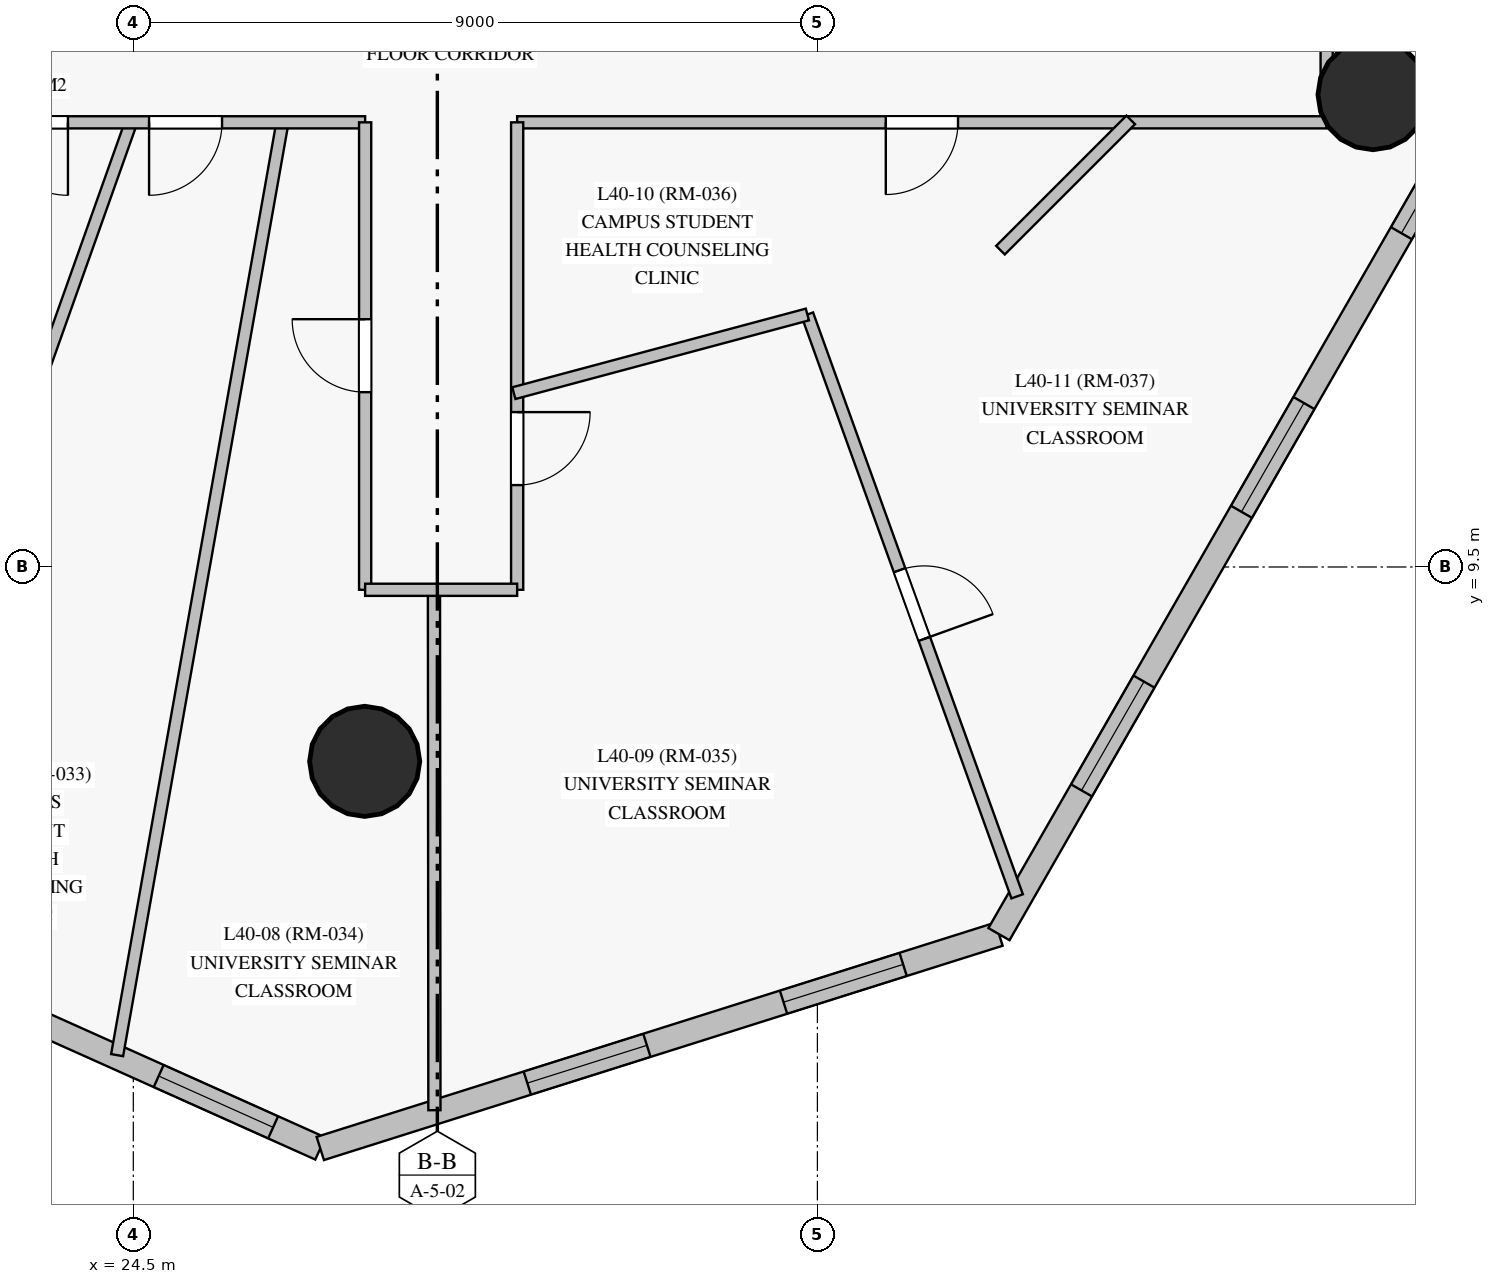
"""IFC4 building model, lengths in metres.
Left out: names, types, materials, properties, quantities, classifications, styles, units other than length and angle.
Written with IfcOpenShell. Run it as: python <this file> out.ifc"""

import sys

from ifc_helpers import new_model, si_unit, direction, frame, frame_2d, origin, origin_with_axes, origin_2d, place, context, subcontext, project, spatial, rectangle, circle, extrude, source, transform, mapped, element, fill, save


model = new_model("IFC4")
c1 = context("Model", 3, precision=1e-05, world=origin(), true_north=direction((0.0, 1.0)))
c2 = subcontext(c1, "Body", "Model", "MODEL_VIEW")
j1 = project(units=[si_unit("LENGTHUNIT", "METRE"), si_unit("PLANEANGLEUNIT", "RADIAN")], contexts=[c1])
p1 = place(None, origin())
s1 = spatial("IfcSite", under=j1, at=p1, CompositionType="ELEMENT")
p2 = place(p1, origin())
s2 = spatial("IfcBuilding", under=s1, at=p2, CompositionType="ELEMENT")
p3 = place(p2, frame((0.0, 0.0, 141.95)))
s3 = spatial("IfcBuildingStorey", under=s2, at=p3, CompositionType="ELEMENT", Elevation=141.95)
m1 = source(origin_with_axes(), c2, "Body", "SweptSolid", [
    extrude(circle(Radius=0.725, at=origin_2d()), origin(), (0.0, 0.0, 1.0), 3.05),
])
for number, where, z_axis, x_axis in (
    (1, (27.544, 6.943, 0.0), (0.0, 0.0, 1.0), (1.0, 0.0, 0.0)),
    (2, (40.81, 15.714, 0.0), (0.0, 0.0, 1.0), (1.0, 0.0, 0.0)),
):
    element("IfcColumn", number, at=place(p3, frame(where, z_axis=z_axis, x_axis=x_axis)), inside=s3, PredefinedType="COLUMN", context=c2, shape_type="MappedRepresentation", body=[
        mapped(m1, transform((0.0, 0.0, 0.0), scale=1.0)),
    ])
p4 = place(p3, frame((16.283, 6.638, 0.0), z_axis=(0.0, 0.0, 1.0), x_axis=(0.912466082441, -0.409152353524, 0.0)))
e3 = element("IfcWall", 3, at=p4, inside=s3, PredefinedType="SOLIDWALL", context=c2, shape_type="SweptSolid", body=[
    extrude(rectangle(XDim=11.701, YDim=0.32, at=frame_2d((5.851, 0.0))), origin(), (0.0, 0.0, 1.0), 2.825),
])
p5 = place(p4, frame((2.215, 0.0, 0.85)))
e4 = element("IfcOpeningElement", 4, at=p5, cuts=e3, PredefinedType="OPENING", context=c2, shape_type="SweptSolid", body=[
    extrude(rectangle(XDim=1.65, YDim=1.65, at=frame_2d((0.825, 0.825))), frame((0.0, 0.17, 0.0), z_axis=(0.0, -1.0, 0.0), x_axis=(1.0, 0.0, 0.0)), (0.0, 0.0, 1.0), 0.34),
])
p6 = place(p4, frame((5.954, 0.0, 0.85)))
e5 = element("IfcOpeningElement", 5, at=p6, cuts=e3, PredefinedType="OPENING", context=c2, shape_type="SweptSolid", body=[
    extrude(rectangle(XDim=1.65, YDim=1.65, at=frame_2d((0.825, 0.825))), frame((0.0, 0.17, 0.0), z_axis=(0.0, -1.0, 0.0), x_axis=(1.0, 0.0, 0.0)), (0.0, 0.0, 1.0), 0.34),
])
p7 = place(p4, frame((9.372, 0.0, 0.85)))
e6 = element("IfcOpeningElement", 6, at=p7, cuts=e3, PredefinedType="OPENING", context=c2, shape_type="SweptSolid", body=[
    extrude(rectangle(XDim=1.65, YDim=1.65, at=frame_2d((0.825, 0.825))), frame((0.0, 0.17, 0.0), z_axis=(0.0, -1.0, 0.0), x_axis=(1.0, 0.0, 0.0)), (0.0, 0.0, 1.0), 0.34),
])
p8 = place(p3, frame((26.96, 1.85, 0.0), z_axis=(0.0, 0.0, 1.0), x_axis=(0.953587787618, 0.301115146257, 0.0)))
e7 = element("IfcWall", 7, at=p8, inside=s3, PredefinedType="SOLIDWALL", context=c2, shape_type="SweptSolid", body=[
    extrude(rectangle(XDim=9.364, YDim=0.32, at=frame_2d((4.682, 0.0))), origin(), (0.0, 0.0, 1.0), 2.825),
])
p9 = place(p8, frame((2.856, 0.0, 0.85)))
e8 = element("IfcOpeningElement", 8, at=p9, cuts=e7, PredefinedType="OPENING", context=c2, shape_type="SweptSolid", body=[
    extrude(rectangle(XDim=1.65, YDim=1.65, at=frame_2d((0.825, 0.825))), frame((0.0, 0.17, 0.0), z_axis=(0.0, -1.0, 0.0), x_axis=(1.0, 0.0, 0.0)), (0.0, 0.0, 1.0), 0.34),
])
p10 = place(p8, frame((6.391, 0.0, 0.85)))
e9 = element("IfcOpeningElement", 9, at=p10, cuts=e7, PredefinedType="OPENING", context=c2, shape_type="SweptSolid", body=[
    extrude(rectangle(XDim=1.65, YDim=1.65, at=frame_2d((0.825, 0.825))), frame((0.0, 0.17, 0.0), z_axis=(0.0, -1.0, 0.0), x_axis=(1.0, 0.0, 0.0)), (0.0, 0.0, 1.0), 0.34),
])
p11 = place(p3, frame((35.889, 4.67, 0.0), z_axis=(0.0, 0.0, 1.0), x_axis=(0.497941368399, 0.867210697372, 0.0)))
e10 = element("IfcWall", 10, at=p11, inside=s3, PredefinedType="SOLIDWALL", context=c2, shape_type="SweptSolid", body=[
    extrude(rectangle(XDim=13.951, YDim=0.32, at=frame_2d((6.976, 0.0))), origin(), (0.0, 0.0, 1.0), 2.825),
])
p12 = place(p11, frame((2.181, 0.0, 0.85)))
e11 = element("IfcOpeningElement", 11, at=p12, cuts=e10, PredefinedType="OPENING", context=c2, shape_type="SweptSolid", body=[
    extrude(rectangle(XDim=1.65, YDim=1.65, at=frame_2d((0.825, 0.825))), frame((0.0, 0.17, 0.0), z_axis=(0.0, -1.0, 0.0), x_axis=(1.0, 0.0, 0.0)), (0.0, 0.0, 1.0), 0.34),
])
p13 = place(p11, frame((6.407, 0.0, 0.85)))
e12 = element("IfcOpeningElement", 12, at=p13, cuts=e10, PredefinedType="OPENING", context=c2, shape_type="SweptSolid", body=[
    extrude(rectangle(XDim=1.65, YDim=1.65, at=frame_2d((0.825, 0.825))), frame((0.0, 0.17, 0.0), z_axis=(0.0, -1.0, 0.0), x_axis=(1.0, 0.0, 0.0)), (0.0, 0.0, 1.0), 0.34),
])
p14 = place(p11, frame((10.633, 0.0, 0.85)))
e13 = element("IfcOpeningElement", 13, at=p14, cuts=e10, PredefinedType="OPENING", context=c2, shape_type="SweptSolid", body=[
    extrude(rectangle(XDim=1.65, YDim=1.65, at=frame_2d((0.825, 0.825))), frame((0.0, 0.17, 0.0), z_axis=(0.0, -1.0, 0.0), x_axis=(1.0, 0.0, 0.0)), (0.0, 0.0, 1.0), 0.34),
])
p15 = place(p3, frame((40.2, 37.65, 0.0), z_axis=(0.0, 0.0, 1.0), x_axis=(0.0, -1.0, 0.0)))
e14 = element("IfcWall", 14, at=p15, inside=s3, PredefinedType="PARTITIONING", context=c2, shape_type="SweptSolid", body=[
    extrude(rectangle(XDim=22.3, YDim=0.16, at=frame_2d((11.15, 0.0))), origin(), (0.0, 0.0, 1.0), 2.325),
])
p16 = place(p15, frame((14.02, 0.0, 0.0)))
e15 = element("IfcOpeningElement", 15, at=p16, cuts=e14, PredefinedType="OPENING", context=c2, shape_type="SweptSolid", body=[
    extrude(rectangle(XDim=0.96, YDim=2.15, at=frame_2d((0.48, 1.075))), frame((0.0, 0.09, 0.0), z_axis=(0.0, -1.0, 0.0), x_axis=(1.0, 0.0, 0.0)), (0.0, 0.0, 1.0), 0.18),
])
p17 = place(p15, frame((10.675, 0.0, 0.0)))
e16 = element("IfcOpeningElement", 16, at=p17, cuts=e14, PredefinedType="OPENING", context=c2, shape_type="SweptSolid", body=[
    extrude(rectangle(XDim=0.95, YDim=2.15, at=frame_2d((0.475, 1.075))), frame((0.0, 0.09, 0.0), z_axis=(0.0, -1.0, 0.0), x_axis=(1.0, 0.0, 0.0)), (0.0, 0.0, 1.0), 0.18),
])
p18 = place(p15, frame((5.1, 0.0, 0.0)))
e17 = element("IfcOpeningElement", 17, at=p18, cuts=e14, PredefinedType="OPENING", context=c2, shape_type="SweptSolid", body=[
    extrude(rectangle(XDim=0.96, YDim=2.15, at=frame_2d((0.48, 1.075))), frame((0.0, 0.09, 0.0), z_axis=(0.0, -1.0, 0.0), x_axis=(1.0, 0.0, 0.0)), (0.0, 0.0, 1.0), 0.18),
])
p19 = place(p3, frame((26.468, 15.379, 0.0), z_axis=(0.0, 0.0, 1.0), x_axis=(-0.174546687902, -0.984648898716, 0.0)))
e18 = element("IfcWall", 18, at=p19, inside=s3, PredefinedType="PARTITIONING", context=c2, shape_type="SweptSolid", body=[
    extrude(rectangle(XDim=12.493, YDim=0.16, at=frame_2d((6.247, 0.0))), origin(), (0.0, 0.0, 1.0), 2.225),
])
p20 = place(p3, frame((24.481, 15.378, 0.0), z_axis=(0.0, 0.0, 1.0), x_axis=(-0.335074645571, -0.942191584496, 0.0)))
e19 = element("IfcWall", 19, at=p20, inside=s3, PredefinedType="PARTITIONING", context=c2, shape_type="SweptSolid", body=[
    extrude(rectangle(XDim=11.341, YDim=0.16, at=frame_2d((5.67, 0.0))), origin(), (0.0, 0.0, 1.0), 2.825),
])
p21 = place(p3, frame((27.55, 15.35, 0.0), z_axis=(0.0, 0.0, 1.0), x_axis=(-1.0, 0.0, 0.0)))
e20 = element("IfcWall", 20, at=p21, inside=s3, PredefinedType="PARTITIONING", context=c2, shape_type="SweptSolid", body=[
    extrude(rectangle(XDim=10.85, YDim=0.16, at=frame_2d((5.425, 0.0))), origin(), (0.0, 0.0, 1.0), 2.325),
])
p22 = place(p21, frame((7.167, 0.0, 0.0)))
e21 = element("IfcOpeningElement", 21, at=p22, cuts=e20, PredefinedType="OPENING", context=c2, shape_type="SweptSolid", body=[
    extrude(rectangle(XDim=0.95, YDim=2.15, at=frame_2d((0.475, 1.075))), frame((0.0, 0.09, 0.0), z_axis=(0.0, -1.0, 0.0), x_axis=(1.0, 0.0, 0.0)), (0.0, 0.0, 1.0), 0.18),
])
p23 = place(p21, frame((3.91, 0.0, 0.0)))
e22 = element("IfcOpeningElement", 22, at=p23, cuts=e20, PredefinedType="OPENING", context=c2, shape_type="SweptSolid", body=[
    extrude(rectangle(XDim=0.96, YDim=2.15, at=frame_2d((0.48, 1.075))), frame((0.0, 0.09, 0.0), z_axis=(0.0, -1.0, 0.0), x_axis=(1.0, 0.0, 0.0)), (0.0, 0.0, 1.0), 0.18),
])
p24 = place(p21, frame((1.883, 0.0, 0.0)))
e23 = element("IfcOpeningElement", 23, at=p24, cuts=e20, PredefinedType="OPENING", context=c2, shape_type="SweptSolid", body=[
    extrude(rectangle(XDim=0.96, YDim=2.15, at=frame_2d((0.48, 1.075))), frame((0.0, 0.09, 0.0), z_axis=(0.0, -1.0, 0.0), x_axis=(1.0, 0.0, 0.0)), (0.0, 0.0, 1.0), 0.18),
])
p25 = place(p21, frame((8.278, 0.0, 0.0)))
e24 = element("IfcOpeningElement", 24, at=p25, cuts=e20, PredefinedType="OPENING", context=c2, shape_type="SweptSolid", body=[
    extrude(rectangle(XDim=0.95, YDim=2.15, at=frame_2d((0.475, 1.075))), frame((0.0, 0.09, 0.0), z_axis=(0.0, -1.0, 0.0), x_axis=(1.0, 0.0, 0.0)), (0.0, 0.0, 1.0), 0.18),
])
p26 = place(p3, frame((40.2, 15.35, 0.0), z_axis=(0.0, 0.0, 1.0), x_axis=(-1.0, 0.0, 0.0)))
e25 = element("IfcWall", 25, at=p26, inside=s3, PredefinedType="PARTITIONING", context=c2, shape_type="SweptSolid", body=[
    extrude(rectangle(XDim=10.65, YDim=0.16, at=frame_2d((5.325, 0.0))), origin(), (0.0, 0.0, 1.0), 2.225),
])
p27 = place(p26, frame((4.85, 0.0, 0.0)))
e26 = element("IfcOpeningElement", 26, at=p27, cuts=e25, PredefinedType="OPENING", context=c2, shape_type="SweptSolid", body=[
    extrude(rectangle(XDim=0.95, YDim=2.15, at=frame_2d((0.475, 1.075))), frame((0.0, 0.09, 0.0), z_axis=(0.0, -1.0, 0.0), x_axis=(1.0, 0.0, 0.0)), (0.0, 0.0, 1.0), 0.18),
])
p28 = place(p3, frame((33.368, 12.822, 0.0), z_axis=(0.0, 0.0, 1.0), x_axis=(0.339168856977, -0.940725510687, 0.0)))
e27 = element("IfcWall", 27, at=p28, inside=s3, PredefinedType="PARTITIONING", context=c2, shape_type="SweptSolid", body=[
    extrude(rectangle(XDim=8.137, YDim=0.16, at=frame_2d((4.068, 0.0))), origin(), (0.0, 0.0, 1.0), 2.825),
])
p29 = place(p28, frame((3.576, 0.0, 0.0)))
e28 = element("IfcOpeningElement", 28, at=p29, cuts=e27, PredefinedType="OPENING", context=c2, shape_type="SweptSolid", body=[
    extrude(rectangle(XDim=0.96, YDim=2.15, at=frame_2d((0.48, 1.075))), frame((0.0, 0.09, 0.0), z_axis=(0.0, -1.0, 0.0), x_axis=(1.0, 0.0, 0.0)), (0.0, 0.0, 1.0), 0.18),
])
p30 = place(p3, frame((28.455, 9.23, 0.0), z_axis=(0.0, 0.0, 1.0), x_axis=(0.000887594623, -0.999999606088, 0.0)))
e29 = element("IfcWall", 29, at=p30, inside=s3, PredefinedType="PARTITIONING", context=c2, shape_type="SweptSolid", body=[
    extrude(rectangle(XDim=6.876, YDim=0.16, at=frame_2d((3.438, 0.0))), origin(), (0.0, 0.0, 1.0), 2.825),
])
p31 = place(p3, frame((29.55, 15.35, 0.0), z_axis=(0.0, 0.0, 1.0), x_axis=(0.0, -1.0, 0.0)))
e30 = element("IfcWall", 30, at=p31, inside=s3, PredefinedType="PARTITIONING", context=c2, shape_type="SweptSolid", body=[
    extrude(rectangle(XDim=6.15, YDim=0.16, at=frame_2d((3.075, 0.0))), origin(), (0.0, 0.0, 1.0), 2.825),
])
p32 = place(p31, frame((3.812, 0.0, 0.0)))
e31 = element("IfcOpeningElement", 31, at=p32, cuts=e30, PredefinedType="OPENING", context=c2, shape_type="SweptSolid", body=[
    extrude(rectangle(XDim=0.96, YDim=2.15, at=frame_2d((0.48, 1.075))), frame((0.0, 0.09, 0.0), z_axis=(0.0, -1.0, 0.0), x_axis=(1.0, 0.0, 0.0)), (0.0, 0.0, 1.0), 0.18),
])
p33 = place(p3, frame((27.55, 9.2, 0.0), z_axis=(0.0, 0.0, 1.0), x_axis=(0.0, 1.0, 0.0)))
e32 = element("IfcWall", 32, at=p33, inside=s3, PredefinedType="PARTITIONING", context=c2, shape_type="SweptSolid", body=[
    extrude(rectangle(XDim=6.15, YDim=0.16, at=frame_2d((3.075, 0.0))), origin(), (0.0, 0.0, 1.0), 2.225),
])
p34 = place(p33, frame((2.6, 0.0, 0.0)))
e33 = element("IfcOpeningElement", 33, at=p34, cuts=e32, PredefinedType="OPENING", context=c2, shape_type="SweptSolid", body=[
    extrude(rectangle(XDim=0.96, YDim=2.15, at=frame_2d((0.48, 1.075))), frame((0.0, 0.09, 0.0), z_axis=(0.0, -1.0, 0.0), x_axis=(1.0, 0.0, 0.0)), (0.0, 0.0, 1.0), 0.18),
])
p35 = place(p3, frame((29.507, 11.787, 0.0), z_axis=(0.0, 0.0, 1.0), x_axis=(0.965928152622, 0.258810362952, 0.0)))
e34 = element("IfcWall", 34, at=p35, inside=s3, PredefinedType="PARTITIONING", context=c2, shape_type="SweptSolid", body=[
    extrude(rectangle(XDim=3.998, YDim=0.16, at=frame_2d((1.999, 0.0))), origin(), (0.0, 0.0, 1.0), 2.325),
])
p36 = place(p3, frame((37.623, 15.382, 0.0), z_axis=(0.0, 0.0, 1.0), x_axis=(-0.707106781187, -0.707106781187, 0.0)))
e35 = element("IfcWall", 35, at=p36, inside=s3, PredefinedType="PARTITIONING", context=c2, shape_type="SweptSolid", body=[
    extrude(rectangle(XDim=2.424, YDim=0.16, at=frame_2d((1.212, 0.0))), origin(), (0.0, 0.0, 1.0), 2.325),
])
p37 = place(p3, frame((29.55, 9.2, 0.0), z_axis=(0.0, 0.0, 1.0), x_axis=(-1.0, 0.0, 0.0)))
e36 = element("IfcWall", 36, at=p37, inside=s3, PredefinedType="PARTITIONING", context=c2, shape_type="SweptSolid", body=[
    extrude(rectangle(XDim=2.0, YDim=0.16, at=frame_2d((1.0, 0.0))), origin(), (0.0, 0.0, 1.0), 2.325),
])
m2 = source(origin_with_axes(), c2, "Body", "SweptSolid", [
    extrude(rectangle(XDim=1.65, YDim=1.65, at=frame_2d((0.825, 0.825))), frame((0.0, 0.03, 0.0), z_axis=(0.0, -1.0, 0.0), x_axis=(1.0, 0.0, 0.0)), (0.0, 0.0, 1.0), 0.06),
])
p38 = place(p7, origin())
e37 = element("IfcWindow", 37, at=p38, inside=s3, PartitioningType="SINGLE_PANEL", PredefinedType="WINDOW", context=c2, shape_type="MappedRepresentation", body=[
    mapped(m2, transform((0.0, 0.0, 0.0), scale=1.0)),
])
fill(e6, e37)
p39 = place(p9, origin())
e38 = element("IfcWindow", 38, at=p39, inside=s3, PartitioningType="SINGLE_PANEL", PredefinedType="WINDOW", context=c2, shape_type="MappedRepresentation", body=[
    mapped(m2, transform((0.0, 0.0, 0.0), scale=1.0)),
])
fill(e8, e38)
p40 = place(p10, origin())
e39 = element("IfcWindow", 39, at=p40, inside=s3, PartitioningType="SINGLE_PANEL", PredefinedType="WINDOW", context=c2, shape_type="MappedRepresentation", body=[
    mapped(m2, transform((0.0, 0.0, 0.0), scale=1.0)),
])
fill(e9, e39)
p41 = place(p12, origin())
e40 = element("IfcWindow", 40, at=p41, inside=s3, PartitioningType="SINGLE_PANEL", PredefinedType="WINDOW", context=c2, shape_type="MappedRepresentation", body=[
    mapped(m2, transform((0.0, 0.0, 0.0), scale=1.0)),
])
fill(e11, e40)
p42 = place(p13, origin())
e41 = element("IfcWindow", 41, at=p42, inside=s3, PartitioningType="SINGLE_PANEL", PredefinedType="WINDOW", context=c2, shape_type="MappedRepresentation", body=[
    mapped(m2, transform((0.0, 0.0, 0.0), scale=1.0)),
])
fill(e12, e41)
p43 = place(p14, origin())
e42 = element("IfcWindow", 42, at=p43, inside=s3, PartitioningType="SINGLE_PANEL", PredefinedType="WINDOW", context=c2, shape_type="MappedRepresentation", body=[
    mapped(m2, transform((0.0, 0.0, 0.0), scale=1.0)),
])
fill(e13, e42)
m3 = source(origin_with_axes(), c2, "Body", "SweptSolid", [
    extrude(rectangle(XDim=0.96, YDim=2.15, at=frame_2d((0.48, 1.075))), frame((0.0, 0.025, 0.0), z_axis=(0.0, -1.0, 0.0), x_axis=(1.0, 0.0, 0.0)), (0.0, 0.0, 1.0), 0.05),
])
p44 = place(p23, origin())
e43 = element("IfcDoor", 43, at=p44, inside=s3, OperationType="SINGLE_SWING_LEFT", PredefinedType="DOOR", context=c2, shape_type="MappedRepresentation", body=[
    mapped(m3, transform((0.0, 0.0, 0.0), scale=1.0)),
])
fill(e22, e43)
p45 = place(p24, origin())
e44 = element("IfcDoor", 44, at=p45, inside=s3, OperationType="SINGLE_SWING_RIGHT", PredefinedType="DOOR", context=c2, shape_type="MappedRepresentation", body=[
    mapped(m3, transform((0.0, 0.0, 0.0), scale=1.0)),
])
fill(e23, e44)
p46 = place(p34, origin())
e45 = element("IfcDoor", 45, at=p46, inside=s3, OperationType="SINGLE_SWING_RIGHT", PredefinedType="DOOR", context=c2, shape_type="MappedRepresentation", body=[
    mapped(m3, transform((0.0, 0.0, 0.0), scale=1.0)),
])
fill(e33, e45)
p47 = place(p32, origin())
e46 = element("IfcDoor", 46, at=p47, inside=s3, OperationType="SINGLE_SWING_LEFT", PredefinedType="DOOR", context=c2, shape_type="MappedRepresentation", body=[
    mapped(m3, transform((0.0, 0.0, 0.0), scale=1.0)),
])
fill(e31, e46)
m4 = source(origin_with_axes(), c2, "Body", "SweptSolid", [
    extrude(rectangle(XDim=0.95, YDim=2.15, at=frame_2d((0.475, 1.075))), frame((0.0, 0.025, 0.0), z_axis=(0.0, -1.0, 0.0), x_axis=(1.0, 0.0, 0.0)), (0.0, 0.0, 1.0), 0.05),
])
p48 = place(p27, origin())
e47 = element("IfcDoor", 47, at=p48, inside=s3, OperationType="SINGLE_SWING_RIGHT", PredefinedType="DOOR", context=c2, shape_type="MappedRepresentation", body=[
    mapped(m4, transform((0.0, 0.0, 0.0), scale=1.0)),
])
fill(e26, e47)
p49 = place(p29, origin())
e48 = element("IfcDoor", 48, at=p49, inside=s3, OperationType="SINGLE_SWING_RIGHT", PredefinedType="DOOR", context=c2, shape_type="MappedRepresentation", body=[
    mapped(m3, transform((0.0, 0.0, 0.0), scale=1.0)),
])
fill(e28, e48)
save(model, sys.argv[1])
